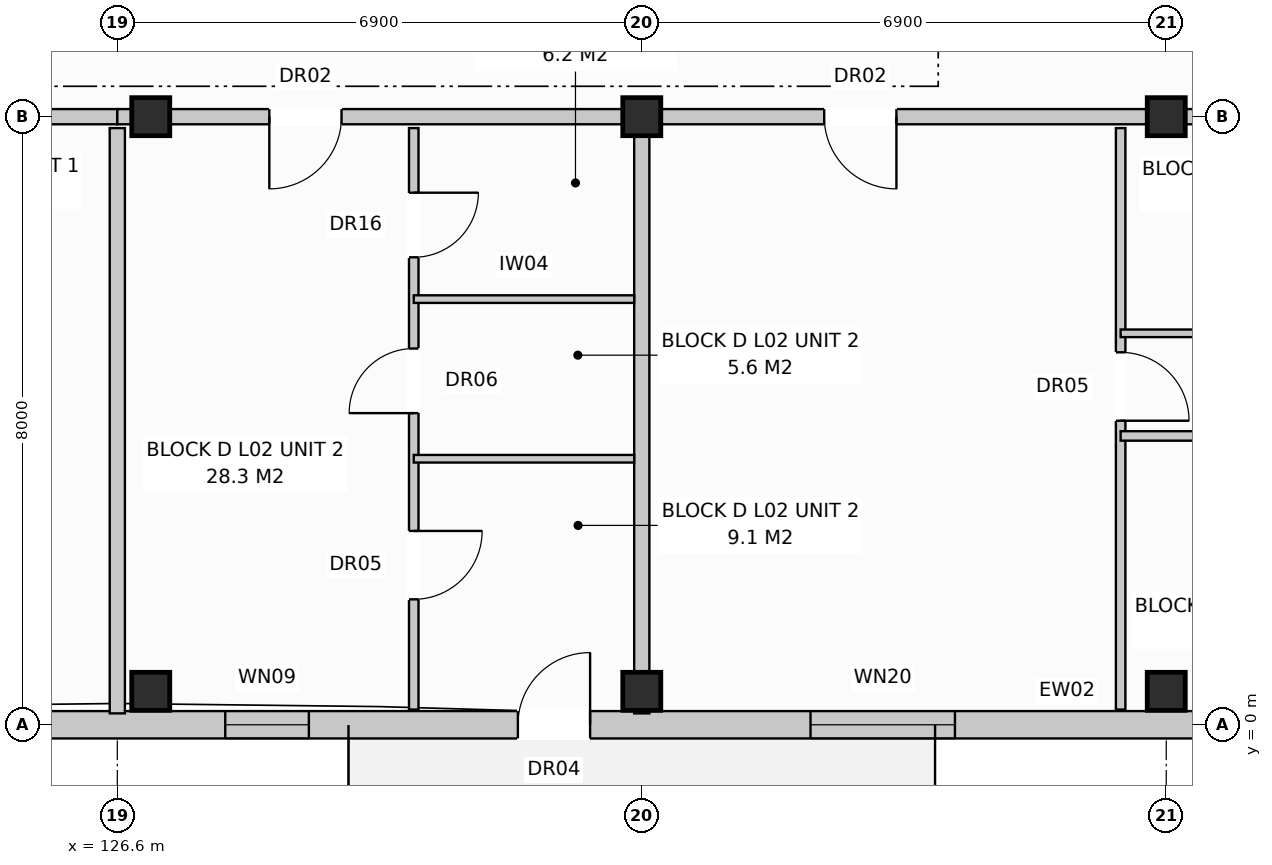
"""IFC4 building model, lengths in metres.
Left out: names, types, materials, properties, quantities, classifications, styles, units other than length and angle.
Written with IfcOpenShell. Run it as: python <this file> out.ifc"""

import sys

from ifc_helpers import new_model, si_unit, direction, frame, frame_2d, origin, origin_with_axes, origin_2d, place, context, subcontext, project, spatial, rectangle, extrude, element, fill, save


model = new_model("IFC4")
c1 = context("Model", 3, precision=1e-05, world=origin(), true_north=direction((0.0, 1.0)))
c2 = subcontext(c1, "Body", "Model", "MODEL_VIEW")
j1 = project(units=[si_unit("LENGTHUNIT", "METRE"), si_unit("PLANEANGLEUNIT", "RADIAN")], contexts=[c1])
p1 = place(None, origin())
s1 = spatial("IfcSite", under=j1, at=p1, CompositionType="ELEMENT")
p2 = place(p1, origin())
s2 = spatial("IfcBuilding", under=s1, at=p2, CompositionType="ELEMENT")
p3 = place(p2, frame((0.0, 0.0, 8.0)))
s3 = spatial("IfcBuildingStorey", under=s2, at=p3, CompositionType="ELEMENT", Elevation=8.0)
for number, where, z_axis, x_axis in (
    (1, (127.04, 0.44, 0.0), (0.0, 0.0, 1.0), (1.0, 0.0, 0.0)),
    (2, (127.04, 8.0, 0.0), (0.0, 0.0, 1.0), (1.0, 0.0, 0.0)),
    (3, (133.5, 0.44, 0.0), (0.0, 0.0, 1.0), (1.0, 0.0, 0.0)),
    (4, (133.5, 8.0, 0.0), (0.0, 0.0, 1.0), (1.0, 0.0, 0.0)),
    (5, (140.4, 0.44, 0.0), (0.0, 0.0, 1.0), (1.0, 0.0, 0.0)),
    (6, (140.4, 8.0, 0.0), (0.0, 0.0, 1.0), (1.0, 0.0, 0.0)),
):
    element("IfcColumn", number, at=place(p3, frame(where, z_axis=z_axis, x_axis=x_axis)), inside=s3, PredefinedType="COLUMN", context=c2, shape_type="SweptSolid", body=[
        extrude(rectangle(XDim=0.5, YDim=0.5, at=origin_2d()), origin(), (0.0, 0.0, 1.0), 3.2),
    ])
p4 = place(p3, frame((112.97, 0.0, 0.0), z_axis=(0.0, 0.0, 1.0), x_axis=(1.0, 0.0, 0.0)))
e7 = element("IfcWall", 7, at=p4, inside=s3, PredefinedType="STANDARD", context=c2, shape_type="SweptSolid", body=[
    extrude(rectangle(XDim=54.86, YDim=0.36, at=frame_2d((27.43, 0.0))), origin(), (0.0, 0.0, 1.0), 2.94),
])
p5 = place(p4, frame((2.788, 0.0, 0.0)))
e8 = element("IfcOpeningElement", 8, at=p5, cuts=e7, PredefinedType="OPENING", context=c2, shape_type="SweptSolid", body=[
    extrude(rectangle(XDim=0.95, YDim=2.1, at=frame_2d((0.475, 1.05))), frame((0.0, 0.192, 0.0), z_axis=(0.0, -1.0, 0.0), x_axis=(1.0, 0.0, 0.0)), (0.0, 0.0, 1.0), 0.384),
])
p6 = place(p4, frame((18.9, 0.0, 0.0)))
e9 = element("IfcOpeningElement", 9, at=p6, cuts=e7, PredefinedType="OPENING", context=c2, shape_type="SweptSolid", body=[
    extrude(rectangle(XDim=0.95, YDim=2.1, at=frame_2d((0.475, 1.05))), frame((0.0, 0.192, 0.0), z_axis=(0.0, -1.0, 0.0), x_axis=(1.0, 0.0, 0.0)), (0.0, 0.0, 1.0), 0.384),
])
p7 = place(p4, frame((30.792, 0.0, 0.0)))
e10 = element("IfcOpeningElement", 10, at=p7, cuts=e7, PredefinedType="OPENING", context=c2, shape_type="SweptSolid", body=[
    extrude(rectangle(XDim=0.95, YDim=2.1, at=frame_2d((0.475, 1.05))), frame((0.0, 0.192, 0.0), z_axis=(0.0, -1.0, 0.0), x_axis=(1.0, 0.0, 0.0)), (0.0, 0.0, 1.0), 0.384),
])
p8 = place(p4, frame((45.191, 0.0, 0.0)))
e11 = element("IfcOpeningElement", 11, at=p8, cuts=e7, PredefinedType="OPENING", context=c2, shape_type="SweptSolid", body=[
    extrude(rectangle(XDim=0.95, YDim=2.1, at=frame_2d((0.475, 1.05))), frame((0.0, 0.192, 0.0), z_axis=(0.0, -1.0, 0.0), x_axis=(1.0, 0.0, 0.0)), (0.0, 0.0, 1.0), 0.384),
])
p9 = place(p4, frame((0.645, 0.0, 0.8)))
e12 = element("IfcOpeningElement", 12, at=p9, cuts=e7, PredefinedType="OPENING", context=c2, shape_type="SweptSolid", body=[
    extrude(rectangle(XDim=1.8, YDim=1.7, at=frame_2d((0.9, 0.85))), frame((0.0, 0.192, 0.0), z_axis=(0.0, -1.0, 0.0), x_axis=(1.0, 0.0, 0.0)), (0.0, 0.0, 1.0), 0.384),
])
p10 = place(p4, frame((4.35, 0.0, 0.72)))
e13 = element("IfcOpeningElement", 13, at=p10, cuts=e7, PredefinedType="OPENING", context=c2, shape_type="SweptSolid", body=[
    extrude(rectangle(XDim=1.9, YDim=1.85, at=frame_2d((0.95, 0.925))), frame((0.0, 0.192, 0.0), z_axis=(0.0, -1.0, 0.0), x_axis=(1.0, 0.0, 0.0)), (0.0, 0.0, 1.0), 0.384),
])
p11 = place(p4, frame((10.45, 0.0, 0.72)))
e14 = element("IfcOpeningElement", 14, at=p11, cuts=e7, PredefinedType="OPENING", context=c2, shape_type="SweptSolid", body=[
    extrude(rectangle(XDim=1.1, YDim=1.5, at=frame_2d((0.55, 0.75))), frame((0.0, 0.192, 0.0), z_axis=(0.0, -1.0, 0.0), x_axis=(1.0, 0.0, 0.0)), (0.0, 0.0, 1.0), 0.384),
])
p12 = place(p4, frame((15.05, 0.0, 0.72)))
e15 = element("IfcOpeningElement", 15, at=p12, cuts=e7, PredefinedType="OPENING", context=c2, shape_type="SweptSolid", body=[
    extrude(rectangle(XDim=1.1, YDim=1.5, at=frame_2d((0.55, 0.75))), frame((0.0, 0.192, 0.0), z_axis=(0.0, -1.0, 0.0), x_axis=(1.0, 0.0, 0.0)), (0.0, 0.0, 1.0), 0.384),
])
p13 = place(p4, frame((22.75, 0.0, 0.8)))
e16 = element("IfcOpeningElement", 16, at=p13, cuts=e7, PredefinedType="OPENING", context=c2, shape_type="SweptSolid", body=[
    extrude(rectangle(XDim=1.9, YDim=1.85, at=frame_2d((0.95, 0.925))), frame((0.0, 0.192, 0.0), z_axis=(0.0, -1.0, 0.0), x_axis=(1.0, 0.0, 0.0)), (0.0, 0.0, 1.0), 0.384),
])
p14 = place(p4, frame((28.85, 0.0, 0.72)))
e17 = element("IfcOpeningElement", 17, at=p14, cuts=e7, PredefinedType="OPENING", context=c2, shape_type="SweptSolid", body=[
    extrude(rectangle(XDim=1.1, YDim=1.5, at=frame_2d((0.55, 0.75))), frame((0.0, 0.192, 0.0), z_axis=(0.0, -1.0, 0.0), x_axis=(1.0, 0.0, 0.0)), (0.0, 0.0, 1.0), 0.384),
])
p15 = place(p4, frame((34.9, 0.0, 0.8)))
e18 = element("IfcOpeningElement", 18, at=p15, cuts=e7, PredefinedType="OPENING", context=c2, shape_type="SweptSolid", body=[
    extrude(rectangle(XDim=1.8, YDim=1.7, at=frame_2d((0.9, 0.85))), frame((0.0, 0.192, 0.0), z_axis=(0.0, -1.0, 0.0), x_axis=(1.0, 0.0, 0.0)), (0.0, 0.0, 1.0), 0.384),
])
p16 = place(p4, frame((38.65, 0.0, 0.72)))
e19 = element("IfcOpeningElement", 19, at=p16, cuts=e7, PredefinedType="OPENING", context=c2, shape_type="SweptSolid", body=[
    extrude(rectangle(XDim=1.1, YDim=1.5, at=frame_2d((0.55, 0.75))), frame((0.0, 0.192, 0.0), z_axis=(0.0, -1.0, 0.0), x_axis=(1.0, 0.0, 0.0)), (0.0, 0.0, 1.0), 0.384),
])
p17 = place(p4, frame((43.35, 0.0, 0.72)))
e20 = element("IfcOpeningElement", 20, at=p17, cuts=e7, PredefinedType="OPENING", context=c2, shape_type="SweptSolid", body=[
    extrude(rectangle(XDim=1.1, YDim=1.5, at=frame_2d((0.55, 0.75))), frame((0.0, 0.192, 0.0), z_axis=(0.0, -1.0, 0.0), x_axis=(1.0, 0.0, 0.0)), (0.0, 0.0, 1.0), 0.384),
])
p18 = place(p4, frame((48.7, 0.0, 0.8)))
e21 = element("IfcOpeningElement", 21, at=p18, cuts=e7, PredefinedType="OPENING", context=c2, shape_type="SweptSolid", body=[
    extrude(rectangle(XDim=1.8, YDim=1.7, at=frame_2d((0.9, 0.85))), frame((0.0, 0.192, 0.0), z_axis=(0.0, -1.0, 0.0), x_axis=(1.0, 0.0, 0.0)), (0.0, 0.0, 1.0), 0.384),
])
p19 = place(p4, frame((52.25, 0.0, 0.72)))
e22 = element("IfcOpeningElement", 22, at=p19, cuts=e7, PredefinedType="OPENING", context=c2, shape_type="SweptSolid", body=[
    extrude(rectangle(XDim=1.1, YDim=1.5, at=frame_2d((0.55, 0.75))), frame((0.0, 0.192, 0.0), z_axis=(0.0, -1.0, 0.0), x_axis=(1.0, 0.0, 0.0)), (0.0, 0.0, 1.0), 0.384),
])
p20 = place(p3, frame((126.6, 7.85, 0.0), z_axis=(0.0, 0.0, 1.0), x_axis=(0.0, -1.0, 0.0)))
e23 = element("IfcWall", 23, at=p20, inside=s3, PredefinedType="PARTITIONING", context=c2, shape_type="SweptSolid", body=[
    extrude(rectangle(XDim=7.7, YDim=0.2, at=frame_2d((3.85, 0.0))), origin(), (0.0, 0.0, 1.0), 2.94),
])
p21 = place(p3, frame((112.8, 8.0, 0.0), z_axis=(0.0, 0.0, 1.0), x_axis=(1.0, 0.0, 0.0)))
e24 = element("IfcWall", 24, at=p21, inside=s3, PredefinedType="PARTITIONING", context=c2, shape_type="SweptSolid", body=[
    extrude(rectangle(XDim=13.8, YDim=0.2, at=frame_2d((6.9, 0.0))), origin(), (0.0, 0.0, 1.0), 2.38),
])
p22 = place(p21, frame((9.6, 0.0, 0.0)))
e25 = element("IfcOpeningElement", 25, at=p22, cuts=e24, PredefinedType="OPENING", context=c2, shape_type="SweptSolid", body=[
    extrude(rectangle(XDim=0.95, YDim=2.15, at=frame_2d((0.475, 1.075))), frame((0.0, 0.112, 0.0), z_axis=(0.0, -1.0, 0.0), x_axis=(1.0, 0.0, 0.0)), (0.0, 0.0, 1.0), 0.224),
])
p23 = place(p3, frame((133.5, 7.85, 0.0), z_axis=(0.0, 0.0, 1.0), x_axis=(0.0, -1.0, 0.0)))
e26 = element("IfcWall", 26, at=p23, inside=s3, PredefinedType="PARTITIONING", context=c2, shape_type="SweptSolid", body=[
    extrude(rectangle(XDim=7.7, YDim=0.2, at=frame_2d((3.85, 0.0))), origin(), (0.0, 0.0, 1.0), 2.94),
])
p24 = place(p3, frame((126.6, 8.0, 0.0), z_axis=(0.0, 0.0, 1.0), x_axis=(1.0, 0.0, 0.0)))
e27 = element("IfcWall", 27, at=p24, inside=s3, PredefinedType="PARTITIONING", context=c2, shape_type="SweptSolid", body=[
    extrude(rectangle(XDim=6.9, YDim=0.2, at=frame_2d((3.45, 0.0))), origin(), (0.0, 0.0, 1.0), 2.38),
])
p25 = place(p24, frame((2.0, 0.0, 0.0)))
e28 = element("IfcOpeningElement", 28, at=p25, cuts=e27, PredefinedType="OPENING", context=c2, shape_type="SweptSolid", body=[
    extrude(rectangle(XDim=0.95, YDim=2.15, at=frame_2d((0.475, 1.075))), frame((0.0, 0.112, 0.0), z_axis=(0.0, -1.0, 0.0), x_axis=(1.0, 0.0, 0.0)), (0.0, 0.0, 1.0), 0.224),
])
p26 = place(p3, frame((130.5, 7.85, 0.0), z_axis=(0.0, 0.0, 1.0), x_axis=(0.0, -1.0, 0.0)))
e29 = element("IfcWall", 29, at=p26, inside=s3, PredefinedType="PARTITIONING", context=c2, shape_type="SweptSolid", body=[
    extrude(rectangle(XDim=7.65, YDim=0.125, at=frame_2d((3.825, 0.0))), origin(), (0.0, 0.0, 1.0), 2.94),
])
p27 = place(p26, frame((0.85, 0.0, 0.0)))
e30 = element("IfcOpeningElement", 30, at=p27, cuts=e29, PredefinedType="OPENING", context=c2, shape_type="SweptSolid", body=[
    extrude(rectangle(XDim=0.85, YDim=2.1, at=frame_2d((0.425, 1.05))), frame((0.0, 0.074, 0.0), z_axis=(0.0, -1.0, 0.0), x_axis=(1.0, 0.0, 0.0)), (0.0, 0.0, 1.0), 0.149),
])
p28 = place(p26, frame((2.9, 0.0, 0.0)))
e31 = element("IfcOpeningElement", 31, at=p28, cuts=e29, PredefinedType="OPENING", context=c2, shape_type="SweptSolid", body=[
    extrude(rectangle(XDim=0.85, YDim=2.05, at=frame_2d((0.425, 1.025))), frame((0.0, 0.074, 0.0), z_axis=(0.0, -1.0, 0.0), x_axis=(1.0, 0.0, 0.0)), (0.0, 0.0, 1.0), 0.149),
])
p29 = place(p26, frame((5.3, 0.0, 0.0)))
e32 = element("IfcOpeningElement", 32, at=p29, cuts=e29, PredefinedType="OPENING", context=c2, shape_type="SweptSolid", body=[
    extrude(rectangle(XDim=0.9, YDim=2.1, at=frame_2d((0.45, 1.05))), frame((0.0, 0.074, 0.0), z_axis=(0.0, -1.0, 0.0), x_axis=(1.0, 0.0, 0.0)), (0.0, 0.0, 1.0), 0.149),
])
for number, where, z_axis, x_axis in (
    (33, (130.5, 5.6, 0.0), (0.0, 0.0, 1.0), (1.0, 0.0, 0.0)),
    (34, (130.5, 3.5, 0.0), (0.0, 0.0, 1.0), (1.0, 0.0, 0.0)),
):
    element("IfcWall", number, at=place(p3, frame(where, z_axis=z_axis, x_axis=x_axis)), inside=s3, PredefinedType="PARTITIONING", context=c2, shape_type="SweptSolid", body=[
        extrude(rectangle(XDim=2.9, YDim=0.1, at=frame_2d((1.45, 0.0))), origin(), (0.0, 0.0, 1.0), 2.94),
    ])
p30 = place(p3, frame((133.5, 8.0, 0.0), z_axis=(0.0, 0.0, 1.0), x_axis=(1.0, 0.0, 0.0)))
e35 = element("IfcWall", 35, at=p30, inside=s3, PredefinedType="PARTITIONING", context=c2, shape_type="SweptSolid", body=[
    extrude(rectangle(XDim=20.7, YDim=0.2, at=frame_2d((10.35, 0.0))), origin(), (0.0, 0.0, 1.0), 2.38),
])
p31 = place(p30, frame((2.4, 0.0, 0.0)))
e36 = element("IfcOpeningElement", 36, at=p31, cuts=e35, PredefinedType="OPENING", context=c2, shape_type="SweptSolid", body=[
    extrude(rectangle(XDim=0.95, YDim=2.15, at=frame_2d((0.475, 1.075))), frame((0.0, 0.112, 0.0), z_axis=(0.0, -1.0, 0.0), x_axis=(1.0, 0.0, 0.0)), (0.0, 0.0, 1.0), 0.224),
])
p32 = place(p3, frame((139.8, 7.85, 0.0), z_axis=(0.0, 0.0, 1.0), x_axis=(0.0, -1.0, 0.0)))
e37 = element("IfcWall", 37, at=p32, inside=s3, PredefinedType="PARTITIONING", context=c2, shape_type="SweptSolid", body=[
    extrude(rectangle(XDim=7.65, YDim=0.125, at=frame_2d((3.825, 0.0))), origin(), (0.0, 0.0, 1.0), 2.94),
])
p33 = place(p32, frame((2.95, 0.0, 0.0)))
e38 = element("IfcOpeningElement", 38, at=p33, cuts=e37, PredefinedType="OPENING", context=c2, shape_type="SweptSolid", body=[
    extrude(rectangle(XDim=0.9, YDim=2.1, at=frame_2d((0.45, 1.05))), frame((0.0, 0.074, 0.0), z_axis=(0.0, -1.0, 0.0), x_axis=(1.0, 0.0, 0.0)), (0.0, 0.0, 1.0), 0.149),
])
p34 = place(p3, frame((139.8, 5.15, 0.0), z_axis=(0.0, 0.0, 1.0), x_axis=(1.0, 0.0, 0.0)))
e39 = element("IfcWall", 39, at=p34, inside=s3, PredefinedType="PARTITIONING", context=c2, shape_type="SweptSolid", body=[
    extrude(rectangle(XDim=14.3, YDim=0.1, at=frame_2d((7.15, 0.0))), origin(), (0.0, 0.0, 1.0), 2.94),
])
p35 = place(p34, frame((1.6, 0.0, 0.0)))
e40 = element("IfcOpeningElement", 40, at=p35, cuts=e39, PredefinedType="OPENING", context=c2, shape_type="SweptSolid", body=[
    extrude(rectangle(XDim=0.9, YDim=2.1, at=frame_2d((0.45, 1.05))), frame((0.0, 0.062, 0.0), z_axis=(0.0, -1.0, 0.0), x_axis=(1.0, 0.0, 0.0)), (0.0, 0.0, 1.0), 0.124),
])
p36 = place(p34, frame((5.1, 0.0, 0.0)))
e41 = element("IfcOpeningElement", 41, at=p36, cuts=e39, PredefinedType="OPENING", context=c2, shape_type="SweptSolid", body=[
    extrude(rectangle(XDim=0.85, YDim=2.05, at=frame_2d((0.425, 1.025))), frame((0.0, 0.062, 0.0), z_axis=(0.0, -1.0, 0.0), x_axis=(1.0, 0.0, 0.0)), (0.0, 0.0, 1.0), 0.124),
])
p37 = place(p34, frame((8.2, 0.0, 0.0)))
e42 = element("IfcOpeningElement", 42, at=p37, cuts=e39, PredefinedType="OPENING", context=c2, shape_type="SweptSolid", body=[
    extrude(rectangle(XDim=0.85, YDim=2.05, at=frame_2d((0.425, 1.025))), frame((0.0, 0.062, 0.0), z_axis=(0.0, -1.0, 0.0), x_axis=(1.0, 0.0, 0.0)), (0.0, 0.0, 1.0), 0.124),
])
p38 = place(p34, frame((11.6, 0.0, 0.0)))
e43 = element("IfcOpeningElement", 43, at=p38, cuts=e39, PredefinedType="OPENING", context=c2, shape_type="SweptSolid", body=[
    extrude(rectangle(XDim=0.85, YDim=2.05, at=frame_2d((0.425, 1.025))), frame((0.0, 0.062, 0.0), z_axis=(0.0, -1.0, 0.0), x_axis=(1.0, 0.0, 0.0)), (0.0, 0.0, 1.0), 0.124),
])
p39 = place(p3, frame((139.8, 3.8, 0.0), z_axis=(0.0, 0.0, 1.0), x_axis=(1.0, 0.0, 0.0)))
e44 = element("IfcWall", 44, at=p39, inside=s3, PredefinedType="PARTITIONING", context=c2, shape_type="SweptSolid", body=[
    extrude(rectangle(XDim=10.4, YDim=0.125, at=frame_2d((5.2, 0.0))), origin(), (0.0, 0.0, 1.0), 2.94),
])
p40 = place(p39, frame((2.0, 0.0, 0.0)))
e45 = element("IfcOpeningElement", 45, at=p40, cuts=e44, PredefinedType="OPENING", context=c2, shape_type="SweptSolid", body=[
    extrude(rectangle(XDim=0.9, YDim=2.1, at=frame_2d((0.45, 1.05))), frame((0.0, 0.074, 0.0), z_axis=(0.0, -1.0, 0.0), x_axis=(1.0, 0.0, 0.0)), (0.0, 0.0, 1.0), 0.149),
])
p41 = place(p39, frame((7.2, 0.0, 0.0)))
e46 = element("IfcOpeningElement", 46, at=p41, cuts=e44, PredefinedType="OPENING", context=c2, shape_type="SweptSolid", body=[
    extrude(rectangle(XDim=0.9, YDim=2.1, at=frame_2d((0.45, 1.05))), frame((0.0, 0.074, 0.0), z_axis=(0.0, -1.0, 0.0), x_axis=(1.0, 0.0, 0.0)), (0.0, 0.0, 1.0), 0.149),
])
p42 = place(p6, origin_with_axes())
e47 = element("IfcDoor", 47, at=p42, inside=s3, OperationType="SINGLE_SWING_RIGHT", PredefinedType="DOOR", context=c2, shape_type="SweptSolid", body=[
    extrude(rectangle(XDim=0.95, YDim=2.1, at=frame_2d((0.475, 1.05))), frame((0.0, 0.025, 0.0), z_axis=(0.0, -1.0, 0.0), x_axis=(1.0, 0.0, 0.0)), (0.0, 0.0, 1.0), 0.05),
])
fill(e9, e47)
p43 = place(p12, origin_with_axes())
e48 = element("IfcWindow", 48, at=p43, inside=s3, PartitioningType="SINGLE_PANEL", PredefinedType="WINDOW", context=c2, shape_type="SweptSolid", body=[
    extrude(rectangle(XDim=1.1, YDim=1.5, at=frame_2d((0.55, 0.75))), frame((0.0, 0.03, 0.0), z_axis=(0.0, -1.0, 0.0), x_axis=(1.0, 0.0, 0.0)), (0.0, 0.0, 1.0), 0.06),
])
fill(e15, e48)
p44 = place(p13, origin_with_axes())
e49 = element("IfcWindow", 49, at=p44, inside=s3, PartitioningType="SINGLE_PANEL", PredefinedType="WINDOW", context=c2, shape_type="SweptSolid", body=[
    extrude(rectangle(XDim=1.9, YDim=1.85, at=frame_2d((0.95, 0.925))), frame((0.0, 0.03, 0.0), z_axis=(0.0, -1.0, 0.0), x_axis=(1.0, 0.0, 0.0)), (0.0, 0.0, 1.0), 0.06),
])
fill(e16, e49)
p45 = place(p25, frame((0.95, 0.0, 0.0), z_axis=(0.0, 0.0, 1.0), x_axis=(-1.0, 0.0, 0.0)))
e50 = element("IfcDoor", 50, at=p45, inside=s3, OperationType="SINGLE_SWING_LEFT", PredefinedType="DOOR", context=c2, shape_type="SweptSolid", body=[
    extrude(rectangle(XDim=0.95, YDim=2.15, at=frame_2d((0.475, 1.075))), frame((0.0, 0.025, 0.0), z_axis=(0.0, -1.0, 0.0), x_axis=(1.0, 0.0, 0.0)), (0.0, 0.0, 1.0), 0.05),
])
fill(e28, e50)
p46 = place(p27, origin_with_axes())
e51 = element("IfcDoor", 51, at=p46, inside=s3, OperationType="SINGLE_SWING_LEFT", PredefinedType="DOOR", context=c2, shape_type="SweptSolid", body=[
    extrude(rectangle(XDim=0.85, YDim=2.1, at=frame_2d((0.425, 1.05))), frame((0.0, 0.025, 0.0), z_axis=(0.0, -1.0, 0.0), x_axis=(1.0, 0.0, 0.0)), (0.0, 0.0, 1.0), 0.05),
])
fill(e30, e51)
p47 = place(p28, frame((0.85, 0.0, 0.0), z_axis=(0.0, 0.0, 1.0), x_axis=(-1.0, 0.0, 0.0)))
e52 = element("IfcDoor", 52, at=p47, inside=s3, OperationType="SINGLE_SWING_RIGHT", PredefinedType="DOOR", context=c2, shape_type="SweptSolid", body=[
    extrude(rectangle(XDim=0.85, YDim=2.05, at=frame_2d((0.425, 1.025))), frame((0.0, 0.025, 0.0), z_axis=(0.0, -1.0, 0.0), x_axis=(1.0, 0.0, 0.0)), (0.0, 0.0, 1.0), 0.05),
])
fill(e31, e52)
p48 = place(p29, origin_with_axes())
e53 = element("IfcDoor", 53, at=p48, inside=s3, OperationType="SINGLE_SWING_LEFT", PredefinedType="DOOR", context=c2, shape_type="SweptSolid", body=[
    extrude(rectangle(XDim=0.9, YDim=2.1, at=frame_2d((0.45, 1.05))), frame((0.0, 0.025, 0.0), z_axis=(0.0, -1.0, 0.0), x_axis=(1.0, 0.0, 0.0)), (0.0, 0.0, 1.0), 0.05),
])
fill(e32, e53)
p49 = place(p31, frame((0.95, 0.0, 0.0), z_axis=(0.0, 0.0, 1.0), x_axis=(-1.0, 0.0, 0.0)))
e54 = element("IfcDoor", 54, at=p49, inside=s3, OperationType="SINGLE_SWING_RIGHT", PredefinedType="DOOR", context=c2, shape_type="SweptSolid", body=[
    extrude(rectangle(XDim=0.95, YDim=2.15, at=frame_2d((0.475, 1.075))), frame((0.0, 0.025, 0.0), z_axis=(0.0, -1.0, 0.0), x_axis=(1.0, 0.0, 0.0)), (0.0, 0.0, 1.0), 0.05),
])
fill(e36, e54)
p50 = place(p33, origin_with_axes())
e55 = element("IfcDoor", 55, at=p50, inside=s3, OperationType="SINGLE_SWING_RIGHT", PredefinedType="DOOR", context=c2, shape_type="SweptSolid", body=[
    extrude(rectangle(XDim=0.9, YDim=2.1, at=frame_2d((0.45, 1.05))), frame((0.0, 0.025, 0.0), z_axis=(0.0, -1.0, 0.0), x_axis=(1.0, 0.0, 0.0)), (0.0, 0.0, 1.0), 0.05),
])
fill(e38, e55)
save(model, sys.argv[1])
